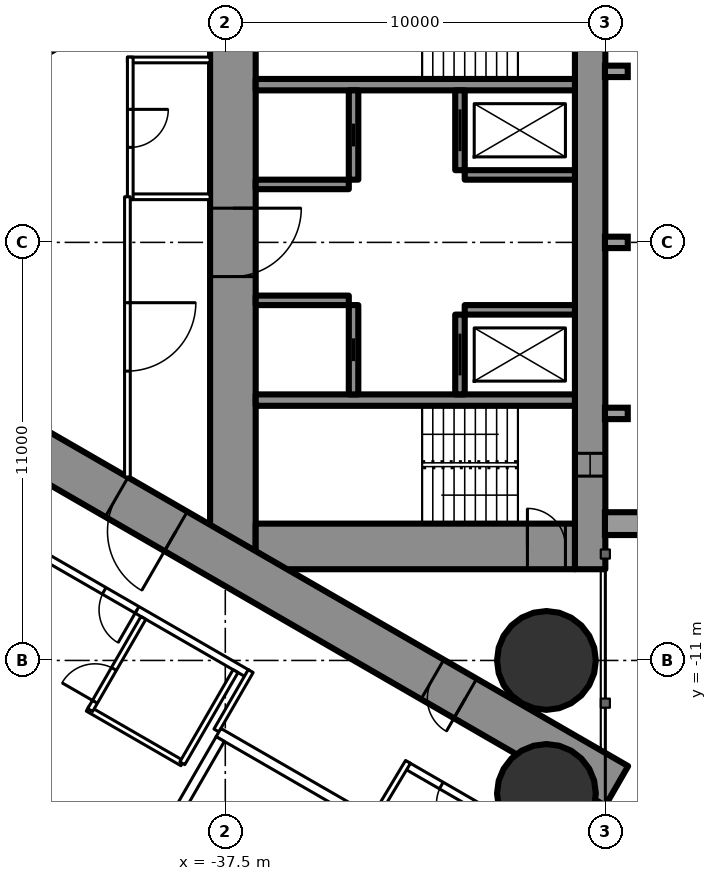
"""IFC4 building model, lengths in metres.
Left out: names, types, materials, properties, quantities, classifications, styles, units other than length and angle.
Written with IfcOpenShell. Run it as: python <this file> out.ifc"""

import sys

from ifc_helpers import new_model, si_unit, direction, frame, frame_2d, origin, origin_2d, place, context, subcontext, project, spatial, rectangle, hollow_circle, extrude, element, fill, save


model = new_model("IFC4")
c1 = context("Model", 3, precision=1e-05, world=origin(), true_north=direction((0.0, 1.0)))
c2 = subcontext(c1, "Body", "Model", "MODEL_VIEW")
j1 = project(units=[si_unit("LENGTHUNIT", "METRE"), si_unit("PLANEANGLEUNIT", "RADIAN")], contexts=[c1])
p1 = place(None, origin())
s1 = spatial("IfcSite", under=j1, at=p1, CompositionType="ELEMENT")
p2 = place(p1, origin())
s2 = spatial("IfcBuilding", under=s1, at=p2, CompositionType="ELEMENT")
p3 = place(p2, frame((0.0, 0.0, 101.1)))
s3 = spatial("IfcBuildingStorey", under=s2, at=p3, CompositionType="ELEMENT", Elevation=101.1)
for number, where, z_axis, x_axis in (
    (1, (-29.05, -11.0, 0.0), (0.0, 0.0, 1.0), (1.0, 0.0, 0.0)),
    (2, (-29.05, -14.5, 0.0), (0.0, 0.0, 1.0), (1.0, 0.0, 0.0)),
):
    element("IfcColumn", number, at=place(p3, frame(where, z_axis=z_axis, x_axis=x_axis)), inside=s3, PredefinedType="COLUMN", context=c2, shape_type="SweptSolid", body=[
        extrude(hollow_circle(Radius=1.3, WallThickness=0.1, at=origin_2d()), origin(), (0.0, 0.0, 1.0), 3.5),
    ])
p4 = place(p3, frame((-27.9, 8.6, 0.0), z_axis=(0.0, 0.0, 1.0), x_axis=(0.0, -1.0, 0.0)))
e3 = element("IfcWall", 3, at=p4, inside=s3, PredefinedType="SHEAR", context=c2, shape_type="SweptSolid", body=[
    extrude(rectangle(XDim=17.2, YDim=0.8, at=frame_2d((8.6, 0.0))), origin(), (0.0, 0.0, 1.0), 3.5),
])
p5 = place(p4, frame((2.45, 0.0, 0.6)))
e4 = element("IfcOpeningElement", 4, at=p5, cuts=e3, PredefinedType="OPENING", context=c2, shape_type="SweptSolid", body=[
    extrude(rectangle(XDim=0.6, YDim=2.1, at=frame_2d((0.3, 1.05))), frame((0.0, 0.41, 0.0), z_axis=(0.0, -1.0, 0.0), x_axis=(1.0, 0.0, 0.0)), (0.0, 0.0, 1.0), 0.82),
])
p6 = place(p4, frame((14.15, 0.0, 0.6)))
e5 = element("IfcOpeningElement", 5, at=p6, cuts=e3, PredefinedType="OPENING", context=c2, shape_type="SweptSolid", body=[
    extrude(rectangle(XDim=0.6, YDim=2.1, at=frame_2d((0.3, 1.05))), frame((0.0, 0.41, 0.0), z_axis=(0.0, -1.0, 0.0), x_axis=(1.0, 0.0, 0.0)), (0.0, 0.0, 1.0), 0.82),
])
p7 = place(p3, frame((-37.3, 8.6, 0.0), z_axis=(0.0, 0.0, 1.0), x_axis=(0.0, -1.0, 0.0)))
e6 = element("IfcWall", 6, at=p7, inside=s3, PredefinedType="SHEAR", context=c2, shape_type="SweptSolid", body=[
    extrude(rectangle(XDim=17.2, YDim=1.2, at=frame_2d((8.6, 0.0))), origin(), (0.0, 0.0, 1.0), 3.5),
])
p8 = place(p7, frame((7.7, 0.0, 0.0)))
e7 = element("IfcOpeningElement", 7, at=p8, cuts=e6, PredefinedType="OPENING", context=c2, shape_type="SweptSolid", body=[
    extrude(rectangle(XDim=1.8, YDim=2.2, at=frame_2d((0.9, 1.1))), frame((0.0, 0.61, 0.0), z_axis=(0.0, -1.0, 0.0), x_axis=(1.0, 0.0, 0.0)), (0.0, 0.0, 1.0), 1.22),
])
p9 = place(p3, frame((-28.3, -8.0, 0.0), z_axis=(0.0, 0.0, 1.0), x_axis=(-1.0, 0.0, 0.0)))
e8 = element("IfcWall", 8, at=p9, inside=s3, PredefinedType="SHEAR", context=c2, shape_type="SweptSolid", body=[
    extrude(rectangle(XDim=8.4, YDim=1.2, at=frame_2d((4.2, 0.0))), origin(), (0.0, 0.0, 1.0), 3.5),
])
p10 = place(p9, frame((0.25, 0.0, 0.0)))
e9 = element("IfcOpeningElement", 9, at=p10, cuts=e8, PredefinedType="OPENING", context=c2, shape_type="SweptSolid", body=[
    extrude(rectangle(XDim=1.0, YDim=2.2, at=frame_2d((0.5, 1.1))), frame((0.0, 0.61, 0.0), z_axis=(0.0, -1.0, 0.0), x_axis=(1.0, 0.0, 0.0)), (0.0, 0.0, 1.0), 1.22),
])
for number, where, z_axis, x_axis in (
    (10, (-28.3, 4.15, 0.0), (0.0, 0.0, 1.0), (-1.0, 0.0, 0.0)),
    (11, (-28.3, -4.15, 0.0), (0.0, 0.0, 1.0), (-1.0, 0.0, 0.0)),
):
    element("IfcWall", number, at=place(p3, frame(where, z_axis=z_axis, x_axis=x_axis)), inside=s3, PredefinedType="SHEAR", context=c2, shape_type="SweptSolid", body=[
        extrude(rectangle(XDim=8.4, YDim=0.3, at=frame_2d((4.2, 0.0))), origin(), (0.0, 0.0, 1.0), 3.5),
    ])
p11 = place(p3, frame((-31.325, 4.0, 0.0), z_axis=(0.0, 0.0, 1.0), x_axis=(0.0, -1.0, 0.0)))
e12 = element("IfcWall", 12, at=p11, inside=s3, PredefinedType="SHEAR", context=c2, shape_type="SweptSolid", body=[
    extrude(rectangle(XDim=2.1, YDim=0.25, at=frame_2d((1.05, 0.0))), origin(), (0.0, 0.0, 1.0), 3.5),
])
p12 = place(p11, frame((0.5, 0.0, 0.0)))
e13 = element("IfcOpeningElement", 13, at=p12, cuts=e12, PredefinedType="OPENING", context=c2, shape_type="SweptSolid", body=[
    extrude(rectangle(XDim=1.1, YDim=2.2, at=frame_2d((0.55, 1.1))), frame((0.0, 0.135, 0.0), z_axis=(0.0, -1.0, 0.0), x_axis=(1.0, 0.0, 0.0)), (0.0, 0.0, 1.0), 0.27),
])
p13 = place(p3, frame((-34.125, 4.0, 0.0), z_axis=(0.0, 0.0, 1.0), x_axis=(0.0, -1.0, 0.0)))
e14 = element("IfcWall", 14, at=p13, inside=s3, PredefinedType="SHEAR", context=c2, shape_type="SweptSolid", body=[
    extrude(rectangle(XDim=2.35, YDim=0.25, at=frame_2d((1.175, 0.0))), origin(), (0.0, 0.0, 1.0), 3.5),
])
p14 = place(p13, frame((0.875, 0.0, 0.0)))
e15 = element("IfcOpeningElement", 15, at=p14, cuts=e14, PredefinedType="OPENING", context=c2, shape_type="SweptSolid", body=[
    extrude(rectangle(XDim=0.6, YDim=2.0, at=frame_2d((0.3, 1.0))), frame((0.0, 0.135, 0.0), z_axis=(0.0, -1.0, 0.0), x_axis=(1.0, 0.0, 0.0)), (0.0, 0.0, 1.0), 0.27),
])
p15 = place(p3, frame((-28.3, 1.775, 0.0), z_axis=(0.0, 0.0, 1.0), x_axis=(-1.0, 0.0, 0.0)))
e16 = element("IfcWall", 16, at=p15, inside=s3, PredefinedType="SHEAR", context=c2, shape_type="SweptSolid", body=[
    extrude(rectangle(XDim=2.9, YDim=0.25, at=frame_2d((1.45, 0.0))), origin(), (0.0, 0.0, 1.0), 3.5),
])
p16 = place(p3, frame((-34.25, 1.525, 0.0), z_axis=(0.0, 0.0, 1.0), x_axis=(-1.0, 0.0, 0.0)))
e17 = element("IfcWall", 17, at=p16, inside=s3, PredefinedType="SHEAR", context=c2, shape_type="SweptSolid", body=[
    extrude(rectangle(XDim=2.45, YDim=0.25, at=frame_2d((1.225, 0.0))), origin(), (0.0, 0.0, 1.0), 3.5),
])
p17 = place(p3, frame((-31.325, -1.9, 0.0), z_axis=(0.0, 0.0, 1.0), x_axis=(0.0, -1.0, 0.0)))
e18 = element("IfcWall", 18, at=p17, inside=s3, PredefinedType="SHEAR", context=c2, shape_type="SweptSolid", body=[
    extrude(rectangle(XDim=2.1, YDim=0.25, at=frame_2d((1.05, 0.0))), origin(), (0.0, 0.0, 1.0), 3.5),
])
p18 = place(p17, frame((0.5, 0.0, 0.0)))
e19 = element("IfcOpeningElement", 19, at=p18, cuts=e18, PredefinedType="OPENING", context=c2, shape_type="SweptSolid", body=[
    extrude(rectangle(XDim=1.1, YDim=2.2, at=frame_2d((0.55, 1.1))), frame((0.0, 0.135, 0.0), z_axis=(0.0, -1.0, 0.0), x_axis=(1.0, 0.0, 0.0)), (0.0, 0.0, 1.0), 0.27),
])
p19 = place(p3, frame((-34.125, -1.65, 0.0), z_axis=(0.0, 0.0, 1.0), x_axis=(0.0, -1.0, 0.0)))
e20 = element("IfcWall", 20, at=p19, inside=s3, PredefinedType="SHEAR", context=c2, shape_type="SweptSolid", body=[
    extrude(rectangle(XDim=2.35, YDim=0.25, at=frame_2d((1.175, 0.0))), origin(), (0.0, 0.0, 1.0), 3.5),
])
p20 = place(p19, frame((0.875, 0.0, 0.0)))
e21 = element("IfcOpeningElement", 21, at=p20, cuts=e20, PredefinedType="OPENING", context=c2, shape_type="SweptSolid", body=[
    extrude(rectangle(XDim=0.6, YDim=2.0, at=frame_2d((0.3, 1.0))), frame((0.0, 0.135, 0.0), z_axis=(0.0, -1.0, 0.0), x_axis=(1.0, 0.0, 0.0)), (0.0, 0.0, 1.0), 0.27),
])
p21 = place(p3, frame((-28.3, -1.775, 0.0), z_axis=(0.0, 0.0, 1.0), x_axis=(-1.0, 0.0, 0.0)))
e22 = element("IfcWall", 22, at=p21, inside=s3, PredefinedType="SHEAR", context=c2, shape_type="SweptSolid", body=[
    extrude(rectangle(XDim=2.9, YDim=0.25, at=frame_2d((1.45, 0.0))), origin(), (0.0, 0.0, 1.0), 3.5),
])
p22 = place(p3, frame((-34.25, -1.525, 0.0), z_axis=(0.0, 0.0, 1.0), x_axis=(-1.0, 0.0, 0.0)))
e23 = element("IfcWall", 23, at=p22, inside=s3, PredefinedType="SHEAR", context=c2, shape_type="SweptSolid", body=[
    extrude(rectangle(XDim=2.45, YDim=0.25, at=frame_2d((1.225, 0.0))), origin(), (0.0, 0.0, 1.0), 3.5),
])
p23 = place(p3, frame((-27.2, 14.3, 0.0), z_axis=(0.0, 0.0, 1.0), x_axis=(-0.866026593062, -0.499997940104, 0.0)))
e24 = element("IfcWall", 24, at=p23, inside=s3, PredefinedType="SHEAR", context=c2, shape_type="SweptSolid", body=[
    extrude(rectangle(XDim=28.946, YDim=1.2, at=frame_2d((14.473, 0.0))), origin(), (0.0, 0.0, 1.0), 3.5),
])
p24 = place(p23, frame((4.6, 0.0, 0.0)))
e25 = element("IfcOpeningElement", 25, at=p24, cuts=e24, PredefinedType="OPENING", context=c2, shape_type="SweptSolid", body=[
    extrude(rectangle(XDim=1.0, YDim=2.2, at=frame_2d((0.5, 1.1))), frame((0.0, 0.61, 0.0), z_axis=(0.0, -1.0, 0.0), x_axis=(1.0, 0.0, 0.0)), (0.0, 0.0, 1.0), 1.22),
])
p25 = place(p23, frame((13.395, 0.0, 0.0)))
e26 = element("IfcOpeningElement", 26, at=p25, cuts=e24, PredefinedType="OPENING", context=c2, shape_type="SweptSolid", body=[
    extrude(rectangle(XDim=1.8, YDim=2.2, at=frame_2d((0.9, 1.1))), frame((0.0, 0.61, 0.0), z_axis=(0.0, -1.0, 0.0), x_axis=(1.0, 0.0, 0.0)), (0.0, 0.0, 1.0), 1.22),
])
p26 = place(p3, frame((-27.2, -14.3, 0.0), z_axis=(0.0, 0.0, 1.0), x_axis=(-0.866024021859, 0.500002393557, 0.0)))
e27 = element("IfcWall", 27, at=p26, inside=s3, PredefinedType="SHEAR", context=c2, shape_type="SweptSolid", body=[
    extrude(rectangle(XDim=27.907, YDim=1.2, at=frame_2d((13.954, 0.0))), origin(), (0.0, 0.0, 1.0), 3.5),
])
p27 = place(p26, frame((4.6, 0.0, 0.0)))
e28 = element("IfcOpeningElement", 28, at=p27, cuts=e27, PredefinedType="OPENING", context=c2, shape_type="SweptSolid", body=[
    extrude(rectangle(XDim=1.0, YDim=2.2, at=frame_2d((0.5, 1.1))), frame((0.0, 0.61, 0.0), z_axis=(0.0, -1.0, 0.0), x_axis=(1.0, 0.0, 0.0)), (0.0, 0.0, 1.0), 1.22),
])
p28 = place(p26, frame((13.395, 0.0, 0.0)))
e29 = element("IfcOpeningElement", 29, at=p28, cuts=e27, PredefinedType="OPENING", context=c2, shape_type="SweptSolid", body=[
    extrude(rectangle(XDim=1.8, YDim=2.2, at=frame_2d((0.9, 1.1))), frame((0.0, 0.61, 0.0), z_axis=(0.0, -1.0, 0.0), x_axis=(1.0, 0.0, 0.0)), (0.0, 0.0, 1.0), 1.22),
])
p29 = place(p3, frame((-27.572, -16.741, 0.0), z_axis=(0.0, 0.0, 1.0), x_axis=(-0.866024464444, 0.500001626982, 0.0)))
e30 = element("IfcWall", 30, at=p29, inside=s3, PredefinedType="PARTITIONING", context=c2, shape_type="SweptSolid", body=[
    extrude(rectangle(XDim=5.955, YDim=0.2, at=frame_2d((2.978, 0.0))), origin(), (0.0, 0.0, 1.0), 3.25),
])
p30 = place(p29, frame((3.95, 0.0, 0.0)))
e31 = element("IfcOpeningElement", 31, at=p30, cuts=e30, PredefinedType="OPENING", context=c2, shape_type="SweptSolid", body=[
    extrude(rectangle(XDim=0.95, YDim=2.2, at=frame_2d((0.475, 1.1))), frame((0.0, 0.11, 0.0), z_axis=(0.0, -1.0, 0.0), x_axis=(1.0, 0.0, 0.0)), (0.0, 0.0, 1.0), 0.22),
])
p31 = place(p3, frame((-36.92, -11.344, 0.0), z_axis=(0.0, 0.0, 1.0), x_axis=(-0.866028313256, 0.499994960614, 0.0)))
e32 = element("IfcWall", 32, at=p31, inside=s3, PredefinedType="PARTITIONING", context=c2, shape_type="SweptSolid", body=[
    extrude(rectangle(XDim=22.568, YDim=0.2, at=frame_2d((11.284, 0.0))), origin(), (0.0, 0.0, 1.0), 3.25),
])
p32 = place(p31, frame((21.018, 0.0, 0.0)))
e33 = element("IfcOpeningElement", 33, at=p32, cuts=e32, PredefinedType="OPENING", context=c2, shape_type="SweptSolid", body=[
    extrude(rectangle(XDim=0.95, YDim=2.2, at=frame_2d((0.475, 1.1))), frame((0.0, 0.11, 0.0), z_axis=(0.0, -1.0, 0.0), x_axis=(1.0, 0.0, 0.0)), (0.0, 0.0, 1.0), 0.22),
])
p33 = place(p31, frame((3.35, 0.0, 0.0)))
e34 = element("IfcOpeningElement", 34, at=p33, cuts=e32, PredefinedType="OPENING", context=c2, shape_type="SweptSolid", body=[
    extrude(rectangle(XDim=1.0, YDim=2.2, at=frame_2d((0.5, 1.1))), frame((0.0, 0.11, 0.0), z_axis=(0.0, -1.0, 0.0), x_axis=(1.0, 0.0, 0.0)), (0.0, 0.0, 1.0), 0.22),
])
p34 = place(p3, frame((-36.831, -11.28, 0.0), z_axis=(0.0, 0.0, 1.0), x_axis=(-0.499937177781, -0.866061671171, 0.0)))
e35 = element("IfcWall", 35, at=p34, inside=s3, PredefinedType="PARTITIONING", context=c2, shape_type="SweptSolid", body=[
    extrude(rectangle(XDim=1.804, YDim=0.15, at=frame_2d((0.902, 0.0))), origin(), (0.0, 0.0, 1.0), 3.25),
])
p35 = place(p3, frame((-33.621, -15.218, 0.0), z_axis=(0.0, 0.0, 1.0), x_axis=(0.514336634837, 0.857588377991, 0.0)))
e36 = element("IfcWall", 36, at=p35, inside=s3, PredefinedType="PARTITIONING", context=c2, shape_type="SweptSolid", body=[
    extrude(rectangle(XDim=1.805, YDim=0.15, at=frame_2d((0.903, 0.0))), origin(), (0.0, 0.0, 1.0), 3.25),
])
p36 = place(p3, frame((-38.63, -13.705, 0.0), z_axis=(0.0, 0.0, 1.0), x_axis=(-0.866018712932, 0.500011588718, 0.0)))
e37 = element("IfcWall", 37, at=p36, inside=s3, PredefinedType="PARTITIONING", context=c2, shape_type="SweptSolid", body=[
    extrude(rectangle(XDim=2.875, YDim=0.15, at=frame_2d((1.438, 0.0))), origin(), (0.0, 0.0, 1.0), 3.25),
])
p37 = place(p3, frame((-39.655, -9.88, 0.0), z_axis=(0.0, 0.0, 1.0), x_axis=(-0.500049511043, -0.865996816683, 0.0)))
e38 = element("IfcWall", 38, at=p37, inside=s3, PredefinedType="PARTITIONING", context=c2, shape_type="SweptSolid", body=[
    extrude(rectangle(XDim=2.8, YDim=0.15, at=frame_2d((1.4, 0.0))), origin(), (0.0, 0.0, 1.0), 3.25),
])
p38 = place(p37, frame((1.55, 0.0, 0.0)))
e39 = element("IfcOpeningElement", 39, at=p38, cuts=e38, PredefinedType="OPENING", context=c2, shape_type="SweptSolid", body=[
    extrude(rectangle(XDim=1.0, YDim=2.2, at=frame_2d((0.5, 1.1))), frame((0.0, 0.085, 0.0), z_axis=(0.0, -1.0, 0.0), x_axis=(1.0, 0.0, 0.0)), (0.0, 0.0, 1.0), 0.17),
])
p39 = place(p3, frame((-37.23, -11.281, 0.0), z_axis=(0.0, 0.0, 1.0), x_axis=(-0.500049511043, -0.865996816683, 0.0)))
e40 = element("IfcWall", 40, at=p39, inside=s3, PredefinedType="PARTITIONING", context=c2, shape_type="SweptSolid", body=[
    extrude(rectangle(XDim=2.8, YDim=0.15, at=frame_2d((1.4, 0.0))), origin(), (0.0, 0.0, 1.0), 3.25),
])
for number, where, z_axis, x_axis in (
    (41, (-37.9, 1.2, 0.0), (0.0, 0.0, 1.0), (-1.0, 0.0, 0.0)),
    (42, (-37.9, 4.8, 0.0), (0.0, 0.0, 1.0), (-1.0, 0.0, 0.0)),
):
    element("IfcWall", number, at=place(p3, frame(where, z_axis=z_axis, x_axis=x_axis)), inside=s3, PredefinedType="PARTITIONING", context=c2, shape_type="SweptSolid", body=[
        extrude(rectangle(XDim=2.175, YDim=0.15, at=frame_2d((1.087, 0.0))), origin(), (0.0, 0.0, 1.0), 3.25),
    ])
p40 = place(p3, frame((-40.0, 4.875, 0.0), z_axis=(0.0, 0.0, 1.0), x_axis=(0.0, -1.0, 0.0)))
e43 = element("IfcWall", 43, at=p40, inside=s3, PredefinedType="PARTITIONING", context=c2, shape_type="SweptSolid", body=[
    extrude(rectangle(XDim=3.75, YDim=0.15, at=frame_2d((1.875, 0.0))), origin(), (0.0, 0.0, 1.0), 3.25),
])
p41 = place(p40, frame((1.375, 0.0, 0.0)))
e44 = element("IfcOpeningElement", 44, at=p41, cuts=e43, PredefinedType="OPENING", context=c2, shape_type="SweptSolid", body=[
    extrude(rectangle(XDim=1.0, YDim=2.2, at=frame_2d((0.5, 1.1))), frame((0.0, 0.085, 0.0), z_axis=(0.0, -1.0, 0.0), x_axis=(1.0, 0.0, 0.0)), (0.0, 0.0, 1.0), 0.17),
])
p42 = place(p3, frame((-40.075, 1.2, 0.0), z_axis=(0.0, 0.0, 1.0), x_axis=(0.0, -1.0, 0.0)))
e45 = element("IfcWall", 45, at=p42, inside=s3, PredefinedType="PARTITIONING", context=c2, shape_type="SweptSolid", body=[
    extrude(rectangle(XDim=7.374, YDim=0.15, at=frame_2d((3.687, 0.0))), origin(), (0.0, 0.0, 1.0), 3.25),
])
p43 = place(p42, frame((2.787, 0.0, 0.0)))
e46 = element("IfcOpeningElement", 46, at=p43, cuts=e45, PredefinedType="OPENING", context=c2, shape_type="SweptSolid", body=[
    extrude(rectangle(XDim=1.8, YDim=2.2, at=frame_2d((0.9, 1.1))), frame((0.0, 0.085, 0.0), z_axis=(0.0, -1.0, 0.0), x_axis=(1.0, 0.0, 0.0)), (0.0, 0.0, 1.0), 0.17),
])
p44 = place(p3, frame((-33.696, -15.197, 0.0), z_axis=(0.0, 0.0, 1.0), x_axis=(-0.865976953817, 0.500083908417, 0.0)))
e47 = element("IfcWall", 47, at=p44, inside=s3, PredefinedType="PARTITIONING", context=c2, shape_type="SweptSolid", body=[
    extrude(rectangle(XDim=4.599, YDim=0.25, at=frame_2d((2.3, 0.0))), origin(), (0.0, 0.0, 1.0), 3.25),
])
p45 = place(p3, frame((-37.633, -13.068, 0.0), z_axis=(0.0, 0.0, 1.0), x_axis=(-0.499872130319, -0.866099216793, 0.0)))
e48 = element("IfcWall", 48, at=p45, inside=s3, PredefinedType="PARTITIONING", context=c2, shape_type="SweptSolid", body=[
    extrude(rectangle(XDim=3.2, YDim=0.25, at=frame_2d((1.6, 0.0))), origin(), (0.0, 0.0, 1.0), 3.25),
])
p46 = place(p38, origin())
e49 = element("IfcDoor", 49, at=p46, inside=s3, OperationType="SINGLE_SWING_RIGHT", PredefinedType="DOOR", context=c2, shape_type="SweptSolid", body=[
    extrude(rectangle(XDim=1.0, YDim=2.2, at=frame_2d((0.5, 1.1))), frame((0.0, 0.025, 0.0), z_axis=(0.0, -1.0, 0.0), x_axis=(1.0, 0.0, 0.0)), (0.0, 0.0, 1.0), 0.05),
])
fill(e39, e49)
p47 = place(p33, origin())
e50 = element("IfcDoor", 50, at=p47, inside=s3, OperationType="SINGLE_SWING_LEFT", PredefinedType="DOOR", context=c2, shape_type="SweptSolid", body=[
    extrude(rectangle(XDim=1.0, YDim=2.2, at=frame_2d((0.5, 1.1))), frame((0.0, 0.025, 0.0), z_axis=(0.0, -1.0, 0.0), x_axis=(1.0, 0.0, 0.0)), (0.0, 0.0, 1.0), 0.05),
])
fill(e34, e50)
p48 = place(p30, origin())
e51 = element("IfcDoor", 51, at=p48, inside=s3, OperationType="SINGLE_SWING_LEFT", PredefinedType="DOOR", context=c2, shape_type="SweptSolid", body=[
    extrude(rectangle(XDim=0.95, YDim=2.2, at=frame_2d((0.475, 1.1))), frame((0.0, 0.025, 0.0), z_axis=(0.0, -1.0, 0.0), x_axis=(1.0, 0.0, 0.0)), (0.0, 0.0, 1.0), 0.05),
])
fill(e31, e51)
p49 = place(p41, origin())
e52 = element("IfcDoor", 52, at=p49, inside=s3, OperationType="SINGLE_SWING_LEFT", PredefinedType="DOOR", context=c2, shape_type="SweptSolid", body=[
    extrude(rectangle(XDim=1.0, YDim=2.2, at=frame_2d((0.5, 1.1))), frame((0.0, 0.025, 0.0), z_axis=(0.0, -1.0, 0.0), x_axis=(1.0, 0.0, 0.0)), (0.0, 0.0, 1.0), 0.05),
])
fill(e44, e52)
p50 = place(p43, origin())
e53 = element("IfcDoor", 53, at=p50, inside=s3, OperationType="DOUBLE_DOOR_SINGLE_SWING", PredefinedType="DOOR", context=c2, shape_type="SweptSolid", body=[
    extrude(rectangle(XDim=1.8, YDim=2.2, at=frame_2d((0.9, 1.1))), frame((0.0, 0.025, 0.0), z_axis=(0.0, -1.0, 0.0), x_axis=(1.0, 0.0, 0.0)), (0.0, 0.0, 1.0), 0.05),
])
fill(e46, e53)
p51 = place(p27, origin())
e54 = element("IfcDoor", 54, at=p51, inside=s3, OperationType="SINGLE_SWING_LEFT", PredefinedType="DOOR", context=c2, shape_type="SweptSolid", body=[
    extrude(rectangle(XDim=1.0, YDim=2.2, at=frame_2d((0.5, 1.1))), frame((0.0, 0.025, 0.0), z_axis=(0.0, -1.0, 0.0), x_axis=(1.0, 0.0, 0.0)), (0.0, 0.0, 1.0), 0.05),
])
fill(e28, e54)
p52 = place(p28, origin())
e55 = element("IfcDoor", 55, at=p52, inside=s3, OperationType="DOUBLE_DOOR_SINGLE_SWING", PredefinedType="DOOR", context=c2, shape_type="SweptSolid", body=[
    extrude(rectangle(XDim=1.8, YDim=2.2, at=frame_2d((0.9, 1.1))), frame((0.0, 0.025, 0.0), z_axis=(0.0, -1.0, 0.0), x_axis=(1.0, 0.0, 0.0)), (0.0, 0.0, 1.0), 0.05),
])
fill(e29, e55)
p53 = place(p8, origin())
e56 = element("IfcDoor", 56, at=p53, inside=s3, OperationType="DOUBLE_DOOR_SINGLE_SWING", PredefinedType="DOOR", context=c2, shape_type="SweptSolid", body=[
    extrude(rectangle(XDim=1.8, YDim=2.2, at=frame_2d((0.9, 1.1))), frame((0.0, 0.025, 0.0), z_axis=(0.0, -1.0, 0.0), x_axis=(1.0, 0.0, 0.0)), (0.0, 0.0, 1.0), 0.05),
])
fill(e7, e56)
p54 = place(p10, origin())
e57 = element("IfcDoor", 57, at=p54, inside=s3, OperationType="SINGLE_SWING_RIGHT", PredefinedType="DOOR", context=c2, shape_type="SweptSolid", body=[
    extrude(rectangle(XDim=1.0, YDim=2.2, at=frame_2d((0.5, 1.1))), frame((0.0, 0.025, 0.0), z_axis=(0.0, -1.0, 0.0), x_axis=(1.0, 0.0, 0.0)), (0.0, 0.0, 1.0), 0.05),
])
fill(e9, e57)
p55 = place(p12, origin())
e58 = element("IfcDoor", 58, at=p55, inside=s3, OperationType="SLIDING_TO_LEFT", PredefinedType="USERDEFINED", context=c2, shape_type="SweptSolid", body=[
    extrude(rectangle(XDim=1.1, YDim=2.2, at=frame_2d((0.55, 1.1))), frame((0.0, 0.025, 0.0), z_axis=(0.0, -1.0, 0.0), x_axis=(1.0, 0.0, 0.0)), (0.0, 0.0, 1.0), 0.05),
])
fill(e13, e58)
p56 = place(p18, origin())
e59 = element("IfcDoor", 59, at=p56, inside=s3, OperationType="SLIDING_TO_LEFT", PredefinedType="USERDEFINED", context=c2, shape_type="SweptSolid", body=[
    extrude(rectangle(XDim=1.1, YDim=2.2, at=frame_2d((0.55, 1.1))), frame((0.0, 0.025, 0.0), z_axis=(0.0, -1.0, 0.0), x_axis=(1.0, 0.0, 0.0)), (0.0, 0.0, 1.0), 0.05),
])
fill(e19, e59)
p57 = place(p14, origin())
e60 = element("IfcDoor", 60, at=p57, inside=s3, OperationType="SLIDING_TO_LEFT", PredefinedType="DOOR", context=c2, shape_type="SweptSolid", body=[
    extrude(rectangle(XDim=0.6, YDim=2.0, at=frame_2d((0.3, 1.0))), frame((0.0, 0.025, 0.0), z_axis=(0.0, -1.0, 0.0), x_axis=(1.0, 0.0, 0.0)), (0.0, 0.0, 1.0), 0.05),
])
fill(e15, e60)
p58 = place(p20, origin())
e61 = element("IfcDoor", 61, at=p58, inside=s3, OperationType="SLIDING_TO_LEFT", PredefinedType="DOOR", context=c2, shape_type="SweptSolid", body=[
    extrude(rectangle(XDim=0.6, YDim=2.0, at=frame_2d((0.3, 1.0))), frame((0.0, 0.025, 0.0), z_axis=(0.0, -1.0, 0.0), x_axis=(1.0, 0.0, 0.0)), (0.0, 0.0, 1.0), 0.05),
])
fill(e21, e61)
p59 = place(p6, origin())
e62 = element("IfcWindow", 62, at=p59, inside=s3, PartitioningType="SINGLE_PANEL", PredefinedType="WINDOW", context=c2, shape_type="SweptSolid", body=[
    extrude(rectangle(XDim=0.6, YDim=2.1, at=frame_2d((0.3, 1.05))), frame((0.0, 0.03, 0.0), z_axis=(0.0, -1.0, 0.0), x_axis=(1.0, 0.0, 0.0)), (0.0, 0.0, 1.0), 0.06),
])
fill(e5, e62)
save(model, sys.argv[1])
